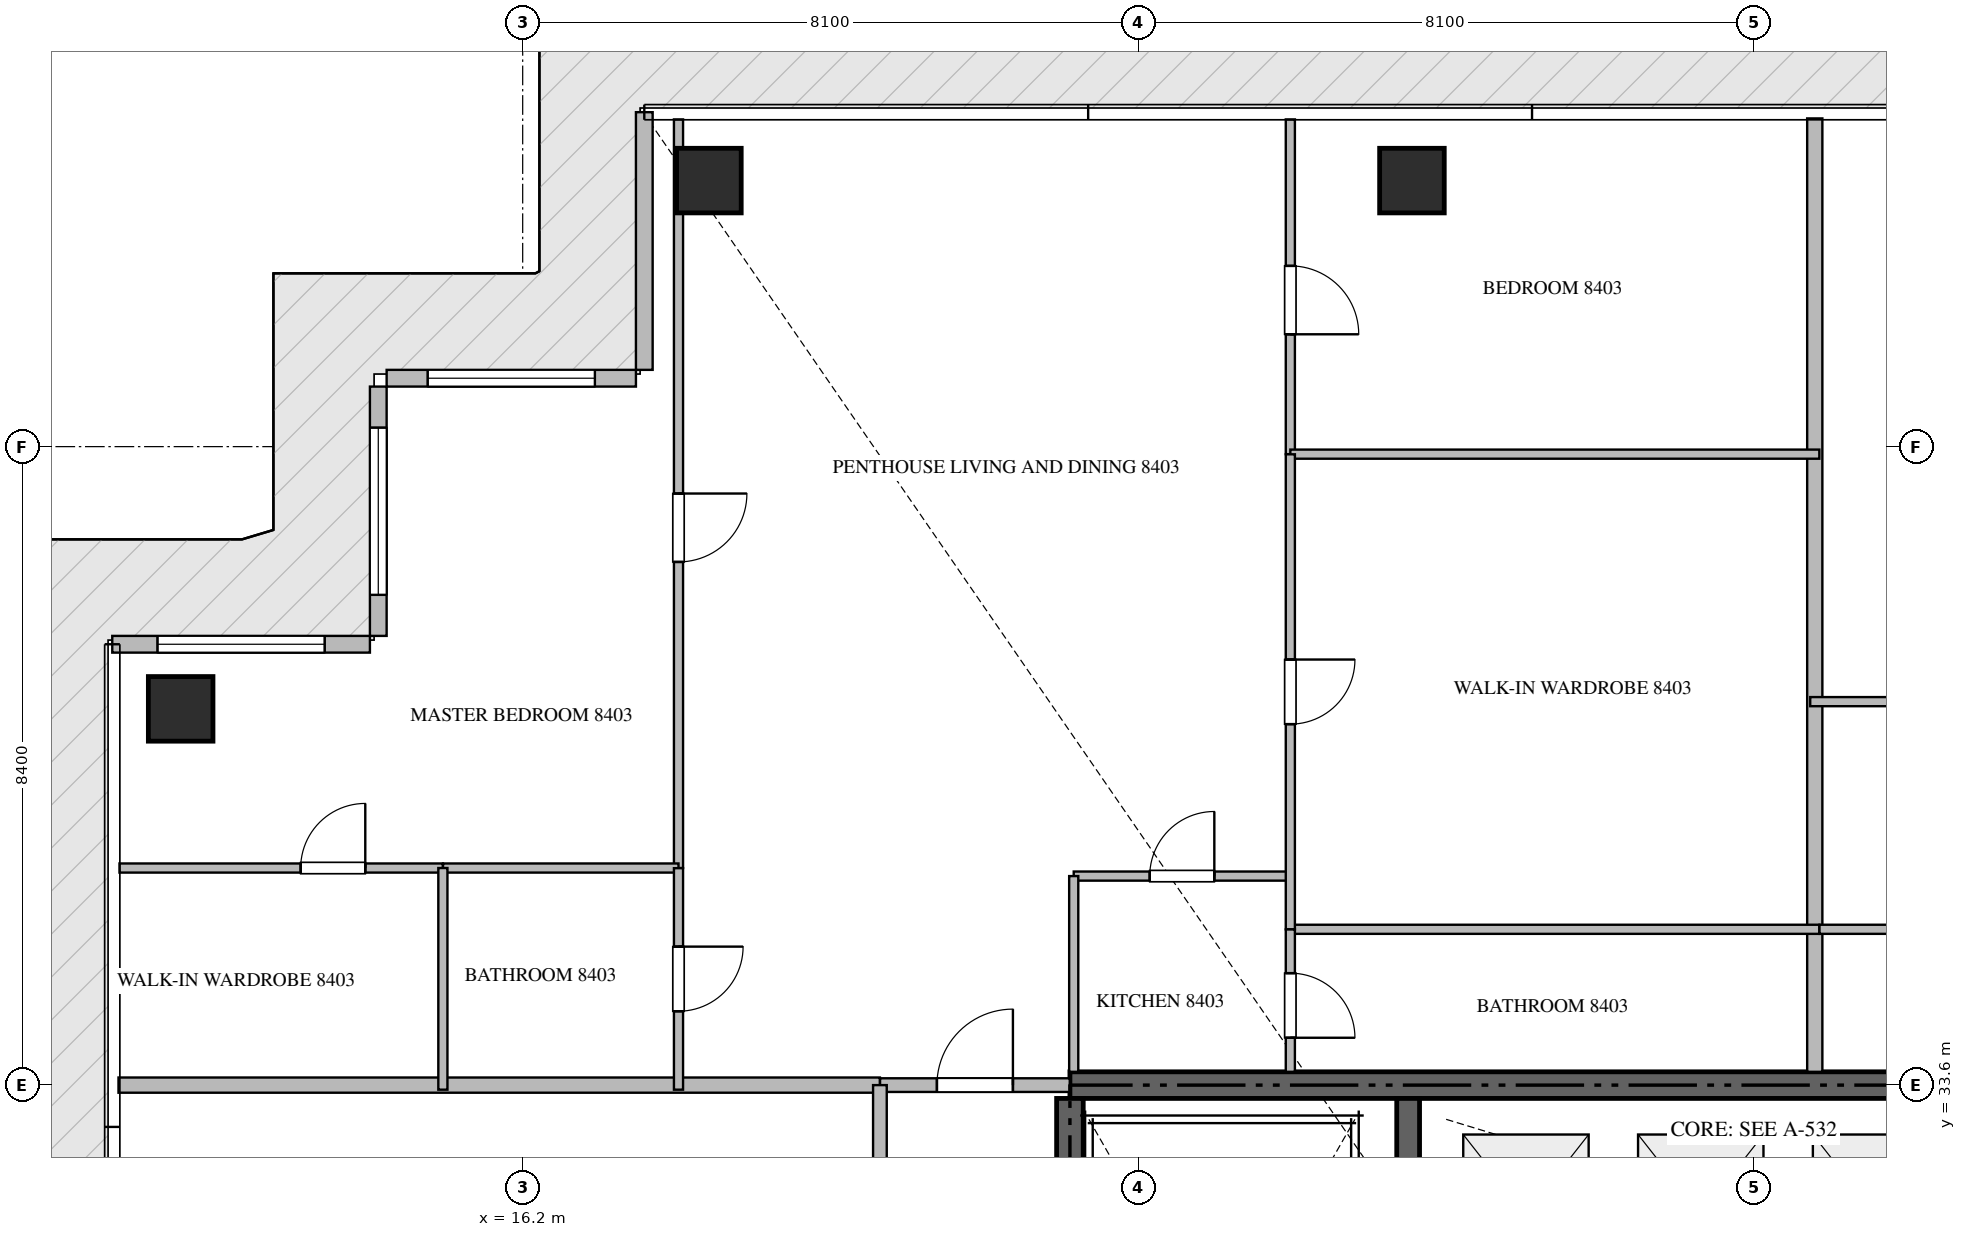
"""IFC4 building model, lengths in metres.
Left out: names, types, materials, properties, quantities, classifications, styles, units other than length and angle.
Written with IfcOpenShell. Run it as: python <this file> out.ifc"""

import sys

from ifc_helpers import new_model, si_unit, direction, frame, frame_2d, origin, origin_2d, place, context, subcontext, project, spatial, rectangle, extrude, source, transform, mapped, element, fill, save


model = new_model("IFC4")
c1 = context("Model", 3, precision=1e-05, world=origin(), true_north=direction((0.0, 1.0)))
c2 = subcontext(c1, "Body", "Model", "MODEL_VIEW")
j1 = project(units=[si_unit("LENGTHUNIT", "METRE"), si_unit("PLANEANGLEUNIT", "RADIAN")], contexts=[c1])
p1 = place(None, origin())
s1 = spatial("IfcSite", under=j1, at=p1, CompositionType="ELEMENT")
p2 = place(p1, origin())
s2 = spatial("IfcBuilding", under=s1, at=p2, CompositionType="ELEMENT")
p3 = place(p2, frame((0.0, 0.0, 338.0)))
s3 = spatial("IfcBuildingStorey", under=s2, at=p3, CompositionType="ELEMENT", Elevation=338.0)
p4 = place(p3, frame((41.4, 33.6, -0.44), z_axis=(0.0, 0.0, 1.0), x_axis=(-1.0, 0.0, 0.0)))
e1 = element("IfcWall", 1, at=p4, inside=s3, PredefinedType="SHEAR", context=c2, shape_type="SweptSolid", body=[
    extrude(rectangle(XDim=18.0, YDim=0.35, at=frame_2d((9.0, 0.0))), origin(), (0.0, 0.0, 1.0), 4.228),
])
p5 = place(p3, frame((23.4, 24.25, -0.44), z_axis=(0.0, 0.0, 1.0), x_axis=(0.0, 1.0, 0.0)))
e2 = element("IfcWall", 2, at=p5, inside=s3, PredefinedType="SHEAR", context=c2, shape_type="SweptSolid", body=[
    extrude(rectangle(XDim=9.175, YDim=0.35, at=frame_2d((4.587, 0.0))), origin(), (0.0, 0.0, 1.0), 4.228),
])
p6 = place(p3, frame((27.85, 23.55, -0.44), z_axis=(0.0, 0.0, 1.0), x_axis=(0.0, 1.0, 0.0)))
e3 = element("IfcWall", 3, at=p6, inside=s3, PredefinedType="SHEAR", context=c2, shape_type="SweptSolid", body=[
    extrude(rectangle(XDim=9.875, YDim=0.3, at=frame_2d((4.938, 0.0))), origin(), (0.0, 0.0, 1.0), 4.228),
])
m1 = source(origin(), c2, "Body", "SweptSolid", [
    extrude(rectangle(XDim=0.85, YDim=0.85, at=origin_2d()), origin(), (0.0, 0.0, 1.0), 4.23),
])
for number, where, z_axis, x_axis in (
    (4, (18.65, 45.5, -0.44), (0.0, 0.0, 1.0), (1.0, 0.0, 0.0)),
    (5, (27.9, 45.5, -0.44), (0.0, 0.0, 1.0), (1.0, 0.0, 0.0)),
    (6, (11.7, 38.55, -0.44), (0.0, 0.0, 1.0), (1.0, 0.0, 0.0)),
):
    element("IfcColumn", number, at=place(p3, frame(where, z_axis=z_axis, x_axis=x_axis)), inside=s3, PredefinedType="COLUMN", context=c2, shape_type="MappedRepresentation", body=[
        mapped(m1, transform((0.0, 0.0, 0.0), scale=1.0)),
    ])
p7 = place(p3, frame((17.8, 46.4, 0.0), z_axis=(0.0, 0.0, 1.0), x_axis=(0.0, -1.0, 0.0)))
e7 = element("IfcWall", 7, at=p7, inside=s3, PredefinedType="ELEMENTEDWALL", context=c2, shape_type="SweptSolid", body=[
    extrude(rectangle(XDim=3.39, YDim=0.22, at=frame_2d((1.695, 0.0))), origin(), (0.0, 0.0, 1.0), 3.775),
])
p8 = place(p3, frame((17.69, 42.9, 0.0), z_axis=(0.0, 0.0, 1.0), x_axis=(-1.0, 0.0, 0.0)))
e8 = element("IfcWall", 8, at=p8, inside=s3, PredefinedType="ELEMENTEDWALL", context=c2, shape_type="SweptSolid", body=[
    extrude(rectangle(XDim=3.28, YDim=0.22, at=frame_2d((1.64, 0.0))), origin(), (0.0, 0.0, 1.0), 3.775),
])
p9 = place(p8, frame((0.54, 0.0, 0.65)))
e9 = element("IfcOpeningElement", 9, at=p9, cuts=e8, PredefinedType="OPENING", context=c2, shape_type="SweptSolid", body=[
    extrude(rectangle(XDim=2.2, YDim=2.4, at=frame_2d((1.1, 1.2))), frame((0.0, 0.12, 0.0), z_axis=(0.0, -1.0, 0.0), x_axis=(1.0, 0.0, 0.0)), (0.0, 0.0, 1.0), 0.24),
])
p10 = place(p3, frame((14.3, 42.79, 0.0), z_axis=(0.0, 0.0, 1.0), x_axis=(0.0, -1.0, 0.0)))
e10 = element("IfcWall", 10, at=p10, inside=s3, PredefinedType="ELEMENTEDWALL", context=c2, shape_type="SweptSolid", body=[
    extrude(rectangle(XDim=3.28, YDim=0.22, at=frame_2d((1.64, 0.0))), origin(), (0.0, 0.0, 1.0), 3.775),
])
p11 = place(p10, frame((0.54, 0.0, 0.65)))
e11 = element("IfcOpeningElement", 11, at=p11, cuts=e10, PredefinedType="OPENING", context=c2, shape_type="SweptSolid", body=[
    extrude(rectangle(XDim=2.2, YDim=2.4, at=frame_2d((1.1, 1.2))), frame((0.0, 0.12, 0.0), z_axis=(0.0, -1.0, 0.0), x_axis=(1.0, 0.0, 0.0)), (0.0, 0.0, 1.0), 0.24),
])
p12 = place(p3, frame((14.19, 39.4, 0.0), z_axis=(0.0, 0.0, 1.0), x_axis=(-1.0, 0.0, 0.0)))
e12 = element("IfcWall", 12, at=p12, inside=s3, PredefinedType="ELEMENTEDWALL", context=c2, shape_type="SweptSolid", body=[
    extrude(rectangle(XDim=3.39, YDim=0.22, at=frame_2d((1.695, 0.0))), origin(), (0.0, 0.0, 1.0), 3.775),
])
p13 = place(p12, frame((0.595, 0.0, 0.65)))
e13 = element("IfcOpeningElement", 13, at=p13, cuts=e12, PredefinedType="OPENING", context=c2, shape_type="SweptSolid", body=[
    extrude(rectangle(XDim=2.2, YDim=2.4, at=frame_2d((1.1, 1.2))), frame((0.0, 0.12, 0.0), z_axis=(0.0, -1.0, 0.0), x_axis=(1.0, 0.0, 0.0)), (0.0, 0.0, 1.0), 0.24),
])
p14 = place(p3, frame((33.2, 33.775, 0.0), z_axis=(0.0, 0.0, 1.0), x_axis=(0.0, 1.0, 0.0)))
e14 = element("IfcWall", 14, at=p14, inside=s3, PredefinedType="PARTITIONING", context=c2, shape_type="SweptSolid", body=[
    extrude(rectangle(XDim=12.543, YDim=0.2, at=frame_2d((6.271, 0.0))), origin(), (0.0, 0.0, 1.0), 3.79),
])
p15 = place(p3, frame((10.882, 33.6, 0.0), z_axis=(0.0, 0.0, 1.0), x_axis=(1.0, 0.0, 0.0)))
e15 = element("IfcWall", 15, at=p15, inside=s3, PredefinedType="PARTITIONING", context=c2, shape_type="SweptSolid", body=[
    extrude(rectangle(XDim=10.018, YDim=0.2, at=frame_2d((5.009, 0.0))), origin(), (0.0, 0.0, 1.0), 3.79),
])
p16 = place(p3, frame((20.902, 33.6, 0.0), z_axis=(0.0, 0.0, 1.0), x_axis=(1.0, 0.0, 0.0)))
e16 = element("IfcWall", 16, at=p16, inside=s3, PredefinedType="PARTITIONING", context=c2, shape_type="SweptSolid", body=[
    extrude(rectangle(XDim=2.496, YDim=0.18, at=frame_2d((1.248, 0.0))), origin(), (0.0, 0.0, 1.0), 3.79),
])
p17 = place(p16, frame((0.748, 0.0, 0.0)))
e17 = element("IfcOpeningElement", 17, at=p17, cuts=e16, PredefinedType="OPENING", context=c2, shape_type="SweptSolid", body=[
    extrude(rectangle(XDim=1.0, YDim=2.15, at=frame_2d((0.5, 1.075))), frame((0.0, 0.1, 0.0), z_axis=(0.0, -1.0, 0.0), x_axis=(1.0, 0.0, 0.0)), (0.0, 0.0, 1.0), 0.2),
])
p18 = place(p3, frame((20.9, 16.8, 0.0), z_axis=(0.0, 0.0, 1.0), x_axis=(0.0, 1.0, 0.0)))
e18 = element("IfcWall", 18, at=p18, inside=s3, PredefinedType="PARTITIONING", context=c2, shape_type="SweptSolid", body=[
    extrude(rectangle(XDim=16.8, YDim=0.18, at=frame_2d((8.4, 0.0))), origin(), (0.0, 0.0, 1.0), 3.79),
])
p19 = place(p18, frame((14.5, 0.0, 0.0)))
e19 = element("IfcOpeningElement", 19, at=p19, cuts=e18, PredefinedType="OPENING", context=c2, shape_type="SweptSolid", body=[
    extrude(rectangle(XDim=1.0, YDim=2.15, at=frame_2d((0.5, 1.075))), frame((0.0, 0.1, 0.0), z_axis=(0.0, -1.0, 0.0), x_axis=(1.0, 0.0, 0.0)), (0.0, 0.0, 1.0), 0.2),
])
p20 = place(p3, frame((23.45, 36.35, 0.0), z_axis=(0.0, 0.0, 1.0), x_axis=(1.0, 0.0, 0.0)))
e20 = element("IfcWall", 20, at=p20, inside=s3, PredefinedType="PARTITIONING", context=c2, shape_type="SweptSolid", body=[
    extrude(rectangle(XDim=2.85, YDim=0.12, at=frame_2d((1.425, 0.0))), origin(), (0.0, 0.0, 1.0), 3.79),
])
p21 = place(p20, frame((1.0, 0.0, 0.0)))
e21 = element("IfcOpeningElement", 21, at=p21, cuts=e20, PredefinedType="OPENING", context=c2, shape_type="SweptSolid", body=[
    extrude(rectangle(XDim=0.85, YDim=2.1, at=frame_2d((0.425, 1.05))), frame((0.0, 0.07, 0.0), z_axis=(0.0, -1.0, 0.0), x_axis=(1.0, 0.0, 0.0)), (0.0, 0.0, 1.0), 0.14),
])
p22 = place(p3, frame((23.45, 36.35, 0.0), z_axis=(0.0, 0.0, 1.0), x_axis=(0.0, -1.0, 0.0)))
e22 = element("IfcWall", 22, at=p22, inside=s3, PredefinedType="PARTITIONING", context=c2, shape_type="SweptSolid", body=[
    extrude(rectangle(XDim=2.575, YDim=0.12, at=frame_2d((1.288, 0.0))), origin(), (0.0, 0.0, 1.0), 3.79),
])
p23 = place(p3, frame((18.25, 46.305, 0.0), z_axis=(0.0, 0.0, 1.0), x_axis=(0.0, -1.0, 0.0)))
e23 = element("IfcWall", 23, at=p23, inside=s3, PredefinedType="PARTITIONING", context=c2, shape_type="SweptSolid", body=[
    extrude(rectangle(XDim=9.849, YDim=0.12, at=frame_2d((4.924, 0.0))), origin(), (0.0, 0.0, 1.0), 3.79),
])
p24 = place(p23, frame((4.922, 0.0, 0.0)))
e24 = element("IfcOpeningElement", 24, at=p24, cuts=e23, PredefinedType="OPENING", context=c2, shape_type="SweptSolid", body=[
    extrude(rectangle(XDim=0.9, YDim=2.1, at=frame_2d((0.45, 1.05))), frame((0.0, 0.07, 0.0), z_axis=(0.0, -1.0, 0.0), x_axis=(1.0, 0.0, 0.0)), (0.0, 0.0, 1.0), 0.14),
])
p25 = place(p3, frame((10.895, 36.456, 0.0), z_axis=(0.0, 0.0, 1.0), x_axis=(1.0, 0.0, 0.0)))
e25 = element("IfcWall", 25, at=p25, inside=s3, PredefinedType="PARTITIONING", context=c2, shape_type="SweptSolid", body=[
    extrude(rectangle(XDim=4.255, YDim=0.12, at=frame_2d((2.127, 0.0))), origin(), (0.0, 0.0, 1.0), 3.79),
])
p26 = place(p25, frame((2.384, 0.0, 0.0)))
e26 = element("IfcOpeningElement", 26, at=p26, cuts=e25, PredefinedType="OPENING", context=c2, shape_type="SweptSolid", body=[
    extrude(rectangle(XDim=0.85, YDim=2.1, at=frame_2d((0.425, 1.05))), frame((0.0, 0.07, 0.0), z_axis=(0.0, -1.0, 0.0), x_axis=(1.0, 0.0, 0.0)), (0.0, 0.0, 1.0), 0.14),
])
p27 = place(p3, frame((15.152, 36.456, 0.0), z_axis=(0.0, 0.0, 1.0), x_axis=(1.0, 0.0, 0.0)))
e27 = element("IfcWall", 27, at=p27, inside=s3, PredefinedType="PARTITIONING", context=c2, shape_type="SweptSolid", body=[
    extrude(rectangle(XDim=3.098, YDim=0.12, at=frame_2d((1.549, 0.0))), origin(), (0.0, 0.0, 1.0), 3.79),
])
p28 = place(p3, frame((15.15, 36.456, 0.0), z_axis=(0.0, 0.0, 1.0), x_axis=(0.0, -1.0, 0.0)))
e28 = element("IfcWall", 28, at=p28, inside=s3, PredefinedType="PARTITIONING", context=c2, shape_type="SweptSolid", body=[
    extrude(rectangle(XDim=2.916, YDim=0.12, at=frame_2d((1.458, 0.0))), origin(), (0.0, 0.0, 1.0), 3.79),
])
p29 = place(p3, frame((18.25, 36.454, 0.0), z_axis=(0.0, 0.0, 1.0), x_axis=(0.0, -1.0, 0.0)))
e29 = element("IfcWall", 29, at=p29, inside=s3, PredefinedType="PARTITIONING", context=c2, shape_type="SweptSolid", body=[
    extrude(rectangle(XDim=2.914, YDim=0.12, at=frame_2d((1.457, 0.0))), origin(), (0.0, 0.0, 1.0), 3.79),
])
p30 = place(p29, frame((1.032, 0.0, 0.0)))
e30 = element("IfcOpeningElement", 30, at=p30, cuts=e29, PredefinedType="OPENING", context=c2, shape_type="SweptSolid", body=[
    extrude(rectangle(XDim=0.85, YDim=2.1, at=frame_2d((0.425, 1.05))), frame((0.0, 0.07, 0.0), z_axis=(0.0, -1.0, 0.0), x_axis=(1.0, 0.0, 0.0)), (0.0, 0.0, 1.0), 0.14),
])
p31 = place(p3, frame((26.3, 46.305, 0.0), z_axis=(0.0, 0.0, 1.0), x_axis=(0.0, -1.0, 0.0)))
e31 = element("IfcWall", 31, at=p31, inside=s3, PredefinedType="PARTITIONING", context=c2, shape_type="SweptSolid", body=[
    extrude(rectangle(XDim=4.404, YDim=0.12, at=frame_2d((2.202, 0.0))), origin(), (0.0, 0.0, 1.0), 3.79),
])
p32 = place(p31, frame((1.927, 0.0, 0.0)))
e32 = element("IfcOpeningElement", 32, at=p32, cuts=e31, PredefinedType="OPENING", context=c2, shape_type="SweptSolid", body=[
    extrude(rectangle(XDim=0.9, YDim=2.1, at=frame_2d((0.45, 1.05))), frame((0.0, 0.07, 0.0), z_axis=(0.0, -1.0, 0.0), x_axis=(1.0, 0.0, 0.0)), (0.0, 0.0, 1.0), 0.14),
])
for number, where, z_axis, x_axis in (
    (33, (26.3, 41.901, 0.0), (0.0, 0.0, 1.0), (1.0, 0.0, 0.0)),
    (34, (26.3, 35.65, 0.0), (0.0, 0.0, 1.0), (1.0, 0.0, 0.0)),
):
    element("IfcWall", number, at=place(p3, frame(where, z_axis=z_axis, x_axis=x_axis)), inside=s3, PredefinedType="PARTITIONING", context=c2, shape_type="SweptSolid", body=[
        extrude(rectangle(XDim=6.96, YDim=0.12, at=frame_2d((3.48, 0.0))), origin(), (0.0, 0.0, 1.0), 3.79),
    ])
p33 = place(p3, frame((26.3, 41.899, 0.0), z_axis=(0.0, 0.0, 1.0), x_axis=(0.0, -1.0, 0.0)))
e35 = element("IfcWall", 35, at=p33, inside=s3, PredefinedType="PARTITIONING", context=c2, shape_type="SweptSolid", body=[
    extrude(rectangle(XDim=6.249, YDim=0.12, at=frame_2d((3.125, 0.0))), origin(), (0.0, 0.0, 1.0), 3.79),
])
p34 = place(p33, frame((2.7, 0.0, 0.0)))
e36 = element("IfcOpeningElement", 36, at=p34, cuts=e35, PredefinedType="OPENING", context=c2, shape_type="SweptSolid", body=[
    extrude(rectangle(XDim=0.85, YDim=2.1, at=frame_2d((0.425, 1.05))), frame((0.0, 0.07, 0.0), z_axis=(0.0, -1.0, 0.0), x_axis=(1.0, 0.0, 0.0)), (0.0, 0.0, 1.0), 0.14),
])
p35 = place(p3, frame((26.3, 35.648, 0.0), z_axis=(0.0, 0.0, 1.0), x_axis=(0.0, -1.0, 0.0)))
e37 = element("IfcWall", 37, at=p35, inside=s3, PredefinedType="PARTITIONING", context=c2, shape_type="SweptSolid", body=[
    extrude(rectangle(XDim=1.873, YDim=0.12, at=frame_2d((0.937, 0.0))), origin(), (0.0, 0.0, 1.0), 3.79),
])
p36 = place(p35, frame((0.575, 0.0, 0.0)))
e38 = element("IfcOpeningElement", 38, at=p36, cuts=e37, PredefinedType="OPENING", context=c2, shape_type="SweptSolid", body=[
    extrude(rectangle(XDim=0.85, YDim=2.1, at=frame_2d((0.425, 1.05))), frame((0.0, 0.07, 0.0), z_axis=(0.0, -1.0, 0.0), x_axis=(1.0, 0.0, 0.0)), (0.0, 0.0, 1.0), 0.14),
])
p37 = place(p3, frame((33.14, 38.645, 0.0), z_axis=(0.0, 0.0, 1.0), x_axis=(1.0, 0.0, 0.0)))
e39 = element("IfcWall", 39, at=p37, inside=s3, PredefinedType="PARTITIONING", context=c2, shape_type="SweptSolid", body=[
    extrude(rectangle(XDim=5.59, YDim=0.12, at=frame_2d((2.795, 0.0))), origin(), (0.0, 0.0, 1.0), 3.412),
])
p38 = place(p3, frame((33.262, 35.65, 0.0), z_axis=(0.0, 0.0, 1.0), x_axis=(1.0, 0.0, 0.0)))
e40 = element("IfcWall", 40, at=p38, inside=s3, PredefinedType="PARTITIONING", context=c2, shape_type="SweptSolid", body=[
    extrude(rectangle(XDim=5.468, YDim=0.12, at=frame_2d((2.734, 0.0))), origin(), (0.0, 0.0, 1.0), 3.79),
])
m2 = source(origin(), c2, "Body", "SweptSolid", [
    extrude(rectangle(XDim=2.2, YDim=2.4, at=frame_2d((1.1, 1.2))), frame((0.0, 0.03, 0.0), z_axis=(0.0, -1.0, 0.0), x_axis=(1.0, 0.0, 0.0)), (0.0, 0.0, 1.0), 0.06),
])
p39 = place(p9, origin())
e41 = element("IfcWindow", 41, at=p39, inside=s3, PartitioningType="SINGLE_PANEL", PredefinedType="WINDOW", context=c2, shape_type="MappedRepresentation", body=[
    mapped(m2, transform((0.0, 0.0, 0.0), scale=1.0)),
])
fill(e9, e41)
p40 = place(p11, origin())
e42 = element("IfcWindow", 42, at=p40, inside=s3, PartitioningType="SINGLE_PANEL", PredefinedType="WINDOW", context=c2, shape_type="MappedRepresentation", body=[
    mapped(m2, transform((0.0, 0.0, 0.0), scale=1.0)),
])
fill(e11, e42)
p41 = place(p13, origin())
e43 = element("IfcWindow", 43, at=p41, inside=s3, PartitioningType="SINGLE_PANEL", PredefinedType="WINDOW", context=c2, shape_type="MappedRepresentation", body=[
    mapped(m2, transform((0.0, 0.0, 0.0), scale=1.0)),
])
fill(e13, e43)
m3 = source(origin(), c2, "Body", "SweptSolid", [
    extrude(rectangle(XDim=1.0, YDim=2.15, at=frame_2d((0.5, 1.075))), frame((0.0, 0.025, 0.0), z_axis=(0.0, -1.0, 0.0), x_axis=(1.0, 0.0, 0.0)), (0.0, 0.0, 1.0), 0.05),
])
p42 = place(p17, origin())
e44 = element("IfcDoor", 44, at=p42, inside=s3, OperationType="SINGLE_SWING_RIGHT", PredefinedType="DOOR", context=c2, shape_type="MappedRepresentation", body=[
    mapped(m3, transform((0.0, 0.0, 0.0), scale=1.0)),
])
fill(e17, e44)
m4 = source(origin(), c2, "Body", "SweptSolid", [
    extrude(rectangle(XDim=0.85, YDim=2.1, at=frame_2d((0.425, 1.05))), frame((0.0, 0.025, 0.0), z_axis=(0.0, -1.0, 0.0), x_axis=(1.0, 0.0, 0.0)), (0.0, 0.0, 1.0), 0.05),
])
p43 = place(p21, origin())
e45 = element("IfcDoor", 45, at=p43, inside=s3, OperationType="SINGLE_SWING_RIGHT", PredefinedType="DOOR", context=c2, shape_type="MappedRepresentation", body=[
    mapped(m4, transform((0.0, 0.0, 0.0), scale=1.0)),
])
fill(e21, e45)
m5 = source(origin(), c2, "Body", "SweptSolid", [
    extrude(rectangle(XDim=0.9, YDim=2.1, at=frame_2d((0.45, 1.05))), frame((0.0, 0.025, 0.0), z_axis=(0.0, -1.0, 0.0), x_axis=(1.0, 0.0, 0.0)), (0.0, 0.0, 1.0), 0.05),
])
p44 = place(p24, origin())
e46 = element("IfcDoor", 46, at=p44, inside=s3, OperationType="SINGLE_SWING_LEFT", PredefinedType="DOOR", context=c2, shape_type="MappedRepresentation", body=[
    mapped(m5, transform((0.0, 0.0, 0.0), scale=1.0)),
])
fill(e24, e46)
p45 = place(p26, origin())
e47 = element("IfcDoor", 47, at=p45, inside=s3, OperationType="SINGLE_SWING_RIGHT", PredefinedType="DOOR", context=c2, shape_type="MappedRepresentation", body=[
    mapped(m4, transform((0.0, 0.0, 0.0), scale=1.0)),
])
fill(e26, e47)
p46 = place(p30, origin())
e48 = element("IfcDoor", 48, at=p46, inside=s3, OperationType="SINGLE_SWING_LEFT", PredefinedType="DOOR", context=c2, shape_type="MappedRepresentation", body=[
    mapped(m4, transform((0.0, 0.0, 0.0), scale=1.0)),
])
fill(e30, e48)
p47 = place(p32, origin())
e49 = element("IfcDoor", 49, at=p47, inside=s3, OperationType="SINGLE_SWING_RIGHT", PredefinedType="DOOR", context=c2, shape_type="MappedRepresentation", body=[
    mapped(m5, transform((0.0, 0.0, 0.0), scale=1.0)),
])
fill(e32, e49)
p48 = place(p34, origin())
e50 = element("IfcDoor", 50, at=p48, inside=s3, OperationType="SINGLE_SWING_LEFT", PredefinedType="DOOR", context=c2, shape_type="MappedRepresentation", body=[
    mapped(m4, transform((0.0, 0.0, 0.0), scale=1.0)),
])
fill(e36, e50)
p49 = place(p36, origin())
e51 = element("IfcDoor", 51, at=p49, inside=s3, OperationType="SINGLE_SWING_RIGHT", PredefinedType="DOOR", context=c2, shape_type="MappedRepresentation", body=[
    mapped(m4, transform((0.0, 0.0, 0.0), scale=1.0)),
])
fill(e38, e51)
save(model, sys.argv[1])
